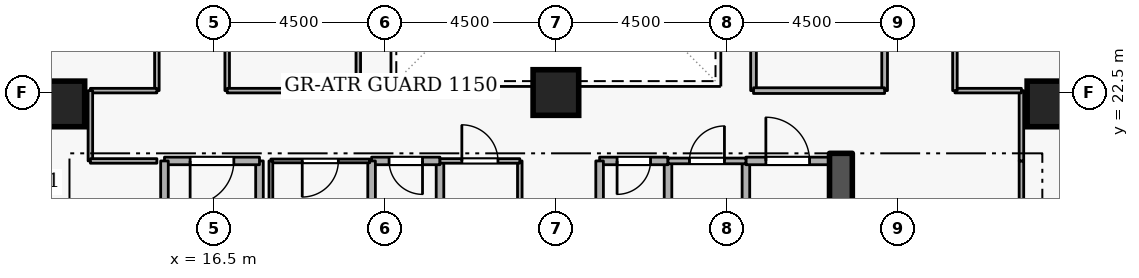
"""IFC4 building model, lengths in metres.
Left out: names, types, materials, properties, quantities, classifications, styles, units other than length and angle.
Written with IfcOpenShell. Run it as: python <this file> out.ifc"""

import sys

from ifc_helpers import new_model, si_unit, direction, frame, frame_2d, origin, origin_2d, place, context, subcontext, project, spatial, rectangle, extrude, element, fill, save


model = new_model("IFC4")
c1 = context("Model", 3, precision=1e-05, world=origin(), true_north=direction((0.0, 1.0)))
c2 = subcontext(c1, "Body", "Model", "MODEL_VIEW")
j1 = project(units=[si_unit("LENGTHUNIT", "METRE"), si_unit("PLANEANGLEUNIT", "RADIAN")], contexts=[c1])
p1 = place(None, origin())
s1 = spatial("IfcSite", under=j1, at=p1, CompositionType="ELEMENT")
p2 = place(p1, origin())
s2 = spatial("IfcBuilding", under=s1, at=p2, CompositionType="ELEMENT")
p3 = place(p2, frame((0.0, 0.0, 116.1)))
s3 = spatial("IfcBuildingStorey", under=s2, at=p3, CompositionType="ELEMENT", Elevation=116.1)
p4 = place(p3, frame((33.0, 15.2, 0.0), z_axis=(0.0, 0.0, 1.0), x_axis=(0.0, 1.0, 0.0)))
e1 = element("IfcWall", 1, at=p4, inside=s3, PredefinedType="SHEAR", context=c2, shape_type="SweptSolid", body=[
    extrude(rectangle(XDim=5.7, YDim=0.6, at=frame_2d((2.85, 0.0))), origin(), (0.0, 0.0, 1.0), 3.6),
])
for number, where, z_axis, x_axis in (
    (2, (12.5, 22.2, 0.0), (0.0, 0.0, 1.0), (1.0, 0.0, 0.0)),
    (3, (38.5, 22.2, 0.0), (0.0, 0.0, 1.0), (1.0, 0.0, 0.0)),
    (4, (25.5, 22.5, 0.0), (0.0, 0.0, 1.0), (1.0, 0.0, 0.0)),
):
    element("IfcColumn", number, at=place(p3, frame(where, z_axis=z_axis, x_axis=x_axis)), inside=s3, PredefinedType="COLUMN", context=c2, shape_type="SweptSolid", body=[
        extrude(rectangle(XDim=1.2, YDim=1.2, at=origin_2d()), origin(), (0.0, 0.0, 1.0), 3.6),
    ])
p5 = place(p3, frame((17.7, 18.4, 0.0), z_axis=(0.0, 0.0, 1.0), x_axis=(0.0, 1.0, 0.0)))
e5 = element("IfcWall", 5, at=p5, inside=s3, PredefinedType="STANDARD", context=c2, shape_type="SweptSolid", body=[
    extrude(rectangle(XDim=2.3, YDim=0.2, at=frame_2d((1.15, 0.0))), origin(), (0.0, 0.0, 1.0), 2.525),
])
p6 = place(p3, frame((17.7, 20.7, 0.0), z_axis=(0.0, 0.0, 1.0), x_axis=(-1.0, 0.0, 0.0)))
e6 = element("IfcWall", 6, at=p6, inside=s3, PredefinedType="STANDARD", context=c2, shape_type="SweptSolid", body=[
    extrude(rectangle(XDim=2.5, YDim=0.2, at=frame_2d((1.25, 0.0))), origin(), (0.0, 0.0, 1.0), 3.32),
])
p7 = place(p6, frame((0.675, 0.0, 0.0)))
e7 = element("IfcOpeningElement", 7, at=p7, cuts=e6, PredefinedType="OPENING", context=c2, shape_type="SweptSolid", body=[
    extrude(rectangle(XDim=1.15, YDim=2.1, at=frame_2d((0.575, 1.05))), frame((0.0, 0.11, 0.0), z_axis=(0.0, -1.0, 0.0), x_axis=(1.0, 0.0, 0.0)), (0.0, 0.0, 1.0), 0.22),
])
p8 = place(p3, frame((15.2, 20.7, 0.0), z_axis=(0.0, 0.0, 1.0), x_axis=(0.0, -1.0, 0.0)))
e8 = element("IfcWall", 8, at=p8, inside=s3, PredefinedType="STANDARD", context=c2, shape_type="SweptSolid", body=[
    extrude(rectangle(XDim=5.7, YDim=0.2, at=frame_2d((2.85, 0.0))), origin(), (0.0, 0.0, 1.0), 3.32),
])
p9 = place(p3, frame((28.45, 18.65, 0.0), z_axis=(0.0, 0.0, 1.0), x_axis=(0.0, 1.0, 0.0)))
e9 = element("IfcWall", 9, at=p9, inside=s3, PredefinedType="STANDARD", context=c2, shape_type="SweptSolid", body=[
    extrude(rectangle(XDim=2.05, YDim=0.2, at=frame_2d((1.025, 0.0))), origin(), (0.0, 0.0, 1.0), 3.32),
])
p10 = place(p3, frame((28.45, 20.7, 0.0), z_axis=(0.0, 0.0, 1.0), x_axis=(-1.0, 0.0, 0.0)))
e10 = element("IfcWall", 10, at=p10, inside=s3, PredefinedType="STANDARD", context=c2, shape_type="SweptSolid", body=[
    extrude(rectangle(XDim=1.8, YDim=0.2, at=frame_2d((0.9, 0.0))), origin(), (0.0, 0.0, 1.0), 3.32),
])
p11 = place(p10, frame((0.46, 0.0, 0.0)))
e11 = element("IfcOpeningElement", 11, at=p11, cuts=e10, PredefinedType="OPENING", context=c2, shape_type="SweptSolid", body=[
    extrude(rectangle(XDim=0.88, YDim=2.04, at=frame_2d((0.44, 1.02))), frame((0.0, 0.11, 0.0), z_axis=(0.0, -1.0, 0.0), x_axis=(1.0, 0.0, 0.0)), (0.0, 0.0, 1.0), 0.22),
])
for number, where, z_axis, x_axis in (
    (12, (26.65, 20.7, 0.0), (0.0, 0.0, 1.0), (0.0, -1.0, 0.0)),
    (13, (22.45, 18.65, 0.0), (0.0, 0.0, 1.0), (0.0, 1.0, 0.0)),
):
    element("IfcWall", number, at=place(p3, frame(where, z_axis=z_axis, x_axis=x_axis)), inside=s3, PredefinedType="STANDARD", context=c2, shape_type="SweptSolid", body=[
        extrude(rectangle(XDim=2.05, YDim=0.2, at=frame_2d((1.025, 0.0))), origin(), (0.0, 0.0, 1.0), 3.32),
    ])
p12 = place(p3, frame((22.45, 20.7, 0.0), z_axis=(0.0, 0.0, 1.0), x_axis=(-1.0, 0.0, 0.0)))
e14 = element("IfcWall", 14, at=p12, inside=s3, PredefinedType="STANDARD", context=c2, shape_type="SweptSolid", body=[
    extrude(rectangle(XDim=1.8, YDim=0.2, at=frame_2d((0.9, 0.0))), origin(), (0.0, 0.0, 1.0), 3.32),
])
p13 = place(p12, frame((0.46, 0.0, 0.0)))
e15 = element("IfcOpeningElement", 15, at=p13, cuts=e14, PredefinedType="OPENING", context=c2, shape_type="SweptSolid", body=[
    extrude(rectangle(XDim=0.88, YDim=2.04, at=frame_2d((0.44, 1.02))), frame((0.0, 0.11, 0.0), z_axis=(0.0, -1.0, 0.0), x_axis=(1.0, 0.0, 0.0)), (0.0, 0.0, 1.0), 0.22),
])
for number, where, z_axis, x_axis in (
    (16, (20.65, 20.7, 0.0), (0.0, 0.0, 1.0), (0.0, -1.0, 0.0)),
    (17, (30.5, 18.65, 0.0), (0.0, 0.0, 1.0), (0.0, 1.0, 0.0)),
):
    element("IfcWall", number, at=place(p3, frame(where, z_axis=z_axis, x_axis=x_axis)), inside=s3, PredefinedType="STANDARD", context=c2, shape_type="SweptSolid", body=[
        extrude(rectangle(XDim=2.05, YDim=0.2, at=frame_2d((1.025, 0.0))), origin(), (0.0, 0.0, 1.0), 3.32),
    ])
p14 = place(p3, frame((30.5, 20.7, 0.0), z_axis=(0.0, 0.0, 1.0), x_axis=(1.0, 0.0, 0.0)))
e18 = element("IfcWall", 18, at=p14, inside=s3, PredefinedType="STANDARD", context=c2, shape_type="SweptSolid", body=[
    extrude(rectangle(XDim=2.2, YDim=0.2, at=frame_2d((1.1, 0.0))), origin(), (0.0, 0.0, 1.0), 3.32),
])
p15 = place(p14, frame((0.525, 0.0, 0.0)))
e19 = element("IfcOpeningElement", 19, at=p15, cuts=e18, PredefinedType="OPENING", context=c2, shape_type="SweptSolid", body=[
    extrude(rectangle(XDim=1.15, YDim=2.1, at=frame_2d((0.575, 1.05))), frame((0.0, 0.11, 0.0), z_axis=(0.0, -1.0, 0.0), x_axis=(1.0, 0.0, 0.0)), (0.0, 0.0, 1.0), 0.22),
])
p16 = place(p3, frame((20.6, 20.7, 0.0), z_axis=(0.0, 0.0, 1.0), x_axis=(-1.0, 0.0, 0.0)))
e20 = element("IfcWall", 20, at=p16, inside=s3, PredefinedType="PARTITIONING", context=c2, shape_type="SweptSolid", body=[
    extrude(rectangle(XDim=2.6, YDim=0.1, at=frame_2d((1.3, 0.0))), origin(), (0.0, 0.0, 1.0), 3.32),
])
p17 = place(p16, frame((0.825, 0.0, 0.0)))
e21 = element("IfcOpeningElement", 21, at=p17, cuts=e20, PredefinedType="OPENING", context=c2, shape_type="SweptSolid", body=[
    extrude(rectangle(XDim=0.95, YDim=2.1, at=frame_2d((0.475, 1.05))), frame((0.0, 0.06, 0.0), z_axis=(0.0, -1.0, 0.0), x_axis=(1.0, 0.0, 0.0)), (0.0, 0.0, 1.0), 0.12),
])
p18 = place(p3, frame((18.0, 20.7, 0.0), z_axis=(0.0, 0.0, 1.0), x_axis=(0.0, -1.0, 0.0)))
e22 = element("IfcWall", 22, at=p18, inside=s3, PredefinedType="PARTITIONING", context=c2, shape_type="SweptSolid", body=[
    extrude(rectangle(XDim=2.05, YDim=0.1, at=frame_2d((1.025, 0.0))), origin(), (0.0, 0.0, 1.0), 2.525),
])
p19 = place(p3, frame((24.55, 20.7, 0.0), z_axis=(0.0, 0.0, 1.0), x_axis=(0.0, -1.0, 0.0)))
e23 = element("IfcWall", 23, at=p19, inside=s3, PredefinedType="PARTITIONING", context=c2, shape_type="SweptSolid", body=[
    extrude(rectangle(XDim=2.05, YDim=0.12, at=frame_2d((1.025, 0.0))), origin(), (0.0, 0.0, 1.0), 3.32),
])
p20 = place(p3, frame((22.45, 20.7, 0.0), z_axis=(0.0, 0.0, 1.0), x_axis=(1.0, 0.0, 0.0)))
e24 = element("IfcWall", 24, at=p20, inside=s3, PredefinedType="PARTITIONING", context=c2, shape_type="SweptSolid", body=[
    extrude(rectangle(XDim=2.1, YDim=0.12, at=frame_2d((1.05, 0.0))), origin(), (0.0, 0.0, 1.0), 3.32),
])
p21 = place(p20, frame((0.575, 0.0, 0.0)))
e25 = element("IfcOpeningElement", 25, at=p21, cuts=e24, PredefinedType="OPENING", context=c2, shape_type="SweptSolid", body=[
    extrude(rectangle(XDim=0.95, YDim=2.1, at=frame_2d((0.475, 1.05))), frame((0.0, 0.07, 0.0), z_axis=(0.0, -1.0, 0.0), x_axis=(1.0, 0.0, 0.0)), (0.0, 0.0, 1.0), 0.14),
])
p22 = place(p3, frame((28.45, 20.7, 0.0), z_axis=(0.0, 0.0, 1.0), x_axis=(1.0, 0.0, 0.0)))
e26 = element("IfcWall", 26, at=p22, inside=s3, PredefinedType="PARTITIONING", context=c2, shape_type="SweptSolid", body=[
    extrude(rectangle(XDim=2.05, YDim=0.15, at=frame_2d((1.025, 0.0))), origin(), (0.0, 0.0, 1.0), 3.32),
])
p23 = place(p22, frame((0.565, 0.0, 0.0)))
e27 = element("IfcOpeningElement", 27, at=p23, cuts=e26, PredefinedType="OPENING", context=c2, shape_type="SweptSolid", body=[
    extrude(rectangle(XDim=0.92, YDim=2.08, at=frame_2d((0.46, 1.04))), frame((0.0, 0.085, 0.0), z_axis=(0.0, -1.0, 0.0), x_axis=(1.0, 0.0, 0.0)), (0.0, 0.0, 1.0), 0.17),
])
p24 = place(p3, frame((15.0, 27.0, 0.0), z_axis=(0.0, 0.0, 1.0), x_axis=(0.0, -1.0, 0.0)))
e28 = element("IfcWall", 28, at=p24, inside=s3, PredefinedType="PARTITIONING", context=c2, shape_type="SweptSolid", body=[
    extrude(rectangle(XDim=4.45, YDim=0.12, at=frame_2d((2.225, 0.0))), origin(), (0.0, 0.0, 1.0), 3.32),
])
p25 = place(p24, frame((1.7, 0.0, 0.0)))
e29 = element("IfcOpeningElement", 29, at=p25, cuts=e28, PredefinedType="OPENING", context=c2, shape_type="SweptSolid", body=[
    extrude(rectangle(XDim=1.05, YDim=2.1, at=frame_2d((0.525, 1.05))), frame((0.0, 0.07, 0.0), z_axis=(0.0, -1.0, 0.0), x_axis=(1.0, 0.0, 0.0)), (0.0, 0.0, 1.0), 0.14),
])
p26 = place(p3, frame((15.0, 22.55, 0.0), z_axis=(0.0, 0.0, 1.0), x_axis=(-1.0, 0.0, 0.0)))
e30 = element("IfcWall", 30, at=p26, inside=s3, PredefinedType="PARTITIONING", context=c2, shape_type="SweptSolid", body=[
    extrude(rectangle(XDim=1.75, YDim=0.12, at=frame_2d((0.875, 0.0))), origin(), (0.0, 0.0, 1.0), 3.32),
])
p27 = place(p3, frame((13.25, 22.55, 0.0), z_axis=(0.0, 0.0, 1.0), x_axis=(0.0, -1.0, 0.0)))
e31 = element("IfcWall", 31, at=p27, inside=s3, PredefinedType="PARTITIONING", context=c2, shape_type="SweptSolid", body=[
    extrude(rectangle(XDim=1.85, YDim=0.12, at=frame_2d((0.925, 0.0))), origin(), (0.0, 0.0, 1.0), 3.32),
])
p28 = place(p3, frame((13.25, 20.7, 0.0), z_axis=(0.0, 0.0, 1.0), x_axis=(1.0, 0.0, 0.0)))
e32 = element("IfcWall", 32, at=p28, inside=s3, PredefinedType="PARTITIONING", context=c2, shape_type="SweptSolid", body=[
    extrude(rectangle(XDim=1.75, YDim=0.12, at=frame_2d((0.875, 0.0))), origin(), (0.0, 0.0, 1.0), 3.32),
])
p29 = place(p3, frame((37.75, 17.55, 0.0), z_axis=(0.0, 0.0, 1.0), x_axis=(0.0, 1.0, 0.0)))
e33 = element("IfcWall", 33, at=p29, inside=s3, PredefinedType="PARTITIONING", context=c2, shape_type="SweptSolid", body=[
    extrude(rectangle(XDim=3.15, YDim=0.12, at=frame_2d((1.575, 0.0))), origin(), (0.0, 0.0, 1.0), 3.32),
])
p30 = place(p3, frame((37.75, 20.7, 0.0), z_axis=(0.0, 0.0, 1.0), x_axis=(0.0, 1.0, 0.0)))
e34 = element("IfcWall", 34, at=p30, inside=s3, PredefinedType="PARTITIONING", context=c2, shape_type="SweptSolid", body=[
    extrude(rectangle(XDim=1.85, YDim=0.12, at=frame_2d((0.925, 0.0))), origin(), (0.0, 0.0, 1.0), 3.32),
])
p31 = place(p3, frame((37.75, 22.55, 0.0), z_axis=(0.0, 0.0, 1.0), x_axis=(-1.0, 0.0, 0.0)))
e35 = element("IfcWall", 35, at=p31, inside=s3, PredefinedType="PARTITIONING", context=c2, shape_type="SweptSolid", body=[
    extrude(rectangle(XDim=1.75, YDim=0.12, at=frame_2d((0.875, 0.0))), origin(), (0.0, 0.0, 1.0), 3.32),
])
p32 = place(p3, frame((36.0, 22.55, 0.0), z_axis=(0.0, 0.0, 1.0), x_axis=(0.0, 1.0, 0.0)))
e36 = element("IfcWall", 36, at=p32, inside=s3, PredefinedType="PARTITIONING", context=c2, shape_type="SweptSolid", body=[
    extrude(rectangle(XDim=4.45, YDim=0.12, at=frame_2d((2.225, 0.0))), origin(), (0.0, 0.0, 1.0), 3.32),
])
p33 = place(p32, frame((1.7, 0.0, 0.0)))
e37 = element("IfcOpeningElement", 37, at=p33, cuts=e36, PredefinedType="OPENING", context=c2, shape_type="SweptSolid", body=[
    extrude(rectangle(XDim=1.05, YDim=2.1, at=frame_2d((0.525, 1.05))), frame((0.0, 0.07, 0.0), z_axis=(0.0, -1.0, 0.0), x_axis=(1.0, 0.0, 0.0)), (0.0, 0.0, 1.0), 0.14),
])
p34 = place(p3, frame((30.7, 22.55, 0.0), z_axis=(0.0, 0.0, 1.0), x_axis=(0.0, 1.0, 0.0)))
e38 = element("IfcWall", 38, at=p34, inside=s3, PredefinedType="PARTITIONING", context=c2, shape_type="SweptSolid", body=[
    extrude(rectangle(XDim=8.9, YDim=0.15, at=frame_2d((4.45, 0.0))), origin(), (0.0, 0.0, 1.0), 3.32),
])
p35 = place(p3, frame((34.15, 31.45, 0.0), z_axis=(0.0, 0.0, 1.0), x_axis=(0.0, -1.0, 0.0)))
e39 = element("IfcWall", 39, at=p35, inside=s3, PredefinedType="PARTITIONING", context=c2, shape_type="SweptSolid", body=[
    extrude(rectangle(XDim=8.9, YDim=0.15, at=frame_2d((4.45, 0.0))), origin(), (0.0, 0.0, 1.0), 3.32),
])
p36 = place(p35, frame((3.8, 0.0, 0.0)))
e40 = element("IfcOpeningElement", 40, at=p36, cuts=e39, PredefinedType="OPENING", context=c2, shape_type="SweptSolid", body=[
    extrude(rectangle(XDim=1.3, YDim=2.12, at=frame_2d((0.65, 1.06))), frame((0.0, 0.085, 0.0), z_axis=(0.0, -1.0, 0.0), x_axis=(1.0, 0.0, 0.0)), (0.0, 0.0, 1.0), 0.17),
])
p37 = place(p3, frame((34.15, 22.55, 0.0), z_axis=(0.0, 0.0, 1.0), x_axis=(-1.0, 0.0, 0.0)))
e41 = element("IfcWall", 41, at=p37, inside=s3, PredefinedType="PARTITIONING", context=c2, shape_type="SweptSolid", body=[
    extrude(rectangle(XDim=3.45, YDim=0.15, at=frame_2d((1.725, 0.0))), origin(), (0.0, 0.0, 1.0), 3.32),
])
p38 = place(p3, frame((16.85, 22.55, 0.0), z_axis=(0.0, 0.0, 1.0), x_axis=(0.0, 1.0, 0.0)))
e42 = element("IfcWall", 42, at=p38, inside=s3, PredefinedType="PARTITIONING", context=c2, shape_type="SweptSolid", body=[
    extrude(rectangle(XDim=8.9, YDim=0.12, at=frame_2d((4.45, 0.0))), origin(), (0.0, 0.0, 1.0), 3.32),
])
p39 = place(p38, frame((2.875, 0.0, 0.0)))
e43 = element("IfcOpeningElement", 43, at=p39, cuts=e42, PredefinedType="OPENING", context=c2, shape_type="SweptSolid", body=[
    extrude(rectangle(XDim=0.95, YDim=2.1, at=frame_2d((0.475, 1.05))), frame((0.0, 0.07, 0.0), z_axis=(0.0, -1.0, 0.0), x_axis=(1.0, 0.0, 0.0)), (0.0, 0.0, 1.0), 0.14),
])
p40 = place(p3, frame((20.3, 31.45, 0.0), z_axis=(0.0, 0.0, 1.0), x_axis=(0.0, -1.0, 0.0)))
e44 = element("IfcWall", 44, at=p40, inside=s3, PredefinedType="PARTITIONING", context=c2, shape_type="SweptSolid", body=[
    extrude(rectangle(XDim=8.9, YDim=0.12, at=frame_2d((4.45, 0.0))), origin(), (0.0, 0.0, 1.0), 3.32),
])
p41 = place(p3, frame((20.3, 22.55, 0.0), z_axis=(0.0, 0.0, 1.0), x_axis=(-1.0, 0.0, 0.0)))
e45 = element("IfcWall", 45, at=p41, inside=s3, PredefinedType="PARTITIONING", context=c2, shape_type="SweptSolid", body=[
    extrude(rectangle(XDim=3.45, YDim=0.12, at=frame_2d((1.725, 0.0))), origin(), (0.0, 0.0, 1.0), 3.32),
])
p42 = place(p7, origin())
e46 = element("IfcDoor", 46, at=p42, inside=s3, OperationType="SINGLE_SWING_RIGHT", PredefinedType="DOOR", context=c2, shape_type="SweptSolid", body=[
    extrude(rectangle(XDim=1.15, YDim=2.1, at=frame_2d((0.575, 1.05))), frame((0.0, 0.025, 0.0), z_axis=(0.0, -1.0, 0.0), x_axis=(1.0, 0.0, 0.0)), (0.0, 0.0, 1.0), 0.05),
])
fill(e7, e46)
p43 = place(p11, origin())
e47 = element("IfcDoor", 47, at=p43, inside=s3, OperationType="SINGLE_SWING_RIGHT", PredefinedType="DOOR", context=c2, shape_type="SweptSolid", body=[
    extrude(rectangle(XDim=0.88, YDim=2.04, at=frame_2d((0.44, 1.02))), frame((0.0, 0.025, 0.0), z_axis=(0.0, -1.0, 0.0), x_axis=(1.0, 0.0, 0.0)), (0.0, 0.0, 1.0), 0.05),
])
fill(e11, e47)
p44 = place(p13, origin())
e48 = element("IfcDoor", 48, at=p44, inside=s3, OperationType="SINGLE_SWING_LEFT", PredefinedType="DOOR", context=c2, shape_type="SweptSolid", body=[
    extrude(rectangle(XDim=0.88, YDim=2.04, at=frame_2d((0.44, 1.02))), frame((0.0, 0.025, 0.0), z_axis=(0.0, -1.0, 0.0), x_axis=(1.0, 0.0, 0.0)), (0.0, 0.0, 1.0), 0.05),
])
fill(e15, e48)
p45 = place(p17, origin())
e49 = element("IfcDoor", 49, at=p45, inside=s3, OperationType="SINGLE_SWING_RIGHT", PredefinedType="DOOR", context=c2, shape_type="SweptSolid", body=[
    extrude(rectangle(XDim=0.95, YDim=2.1, at=frame_2d((0.475, 1.05))), frame((0.0, 0.025, 0.0), z_axis=(0.0, -1.0, 0.0), x_axis=(1.0, 0.0, 0.0)), (0.0, 0.0, 1.0), 0.05),
])
fill(e21, e49)
p46 = place(p21, origin())
e50 = element("IfcDoor", 50, at=p46, inside=s3, OperationType="SINGLE_SWING_LEFT", PredefinedType="DOOR", context=c2, shape_type="SweptSolid", body=[
    extrude(rectangle(XDim=0.95, YDim=2.1, at=frame_2d((0.475, 1.05))), frame((0.0, 0.025, 0.0), z_axis=(0.0, -1.0, 0.0), x_axis=(1.0, 0.0, 0.0)), (0.0, 0.0, 1.0), 0.05),
])
fill(e25, e50)
p47 = place(p23, origin())
e51 = element("IfcDoor", 51, at=p47, inside=s3, OperationType="SINGLE_SWING_RIGHT", PredefinedType="DOOR", context=c2, shape_type="SweptSolid", body=[
    extrude(rectangle(XDim=0.92, YDim=2.08, at=frame_2d((0.46, 1.04))), frame((0.0, 0.025, 0.0), z_axis=(0.0, -1.0, 0.0), x_axis=(1.0, 0.0, 0.0)), (0.0, 0.0, 1.0), 0.05),
])
fill(e27, e51)
p48 = place(p15, origin())
e52 = element("IfcDoor", 52, at=p48, inside=s3, OperationType="SINGLE_SWING_LEFT", PredefinedType="DOOR", context=c2, shape_type="SweptSolid", body=[
    extrude(rectangle(XDim=1.15, YDim=2.1, at=frame_2d((0.575, 1.05))), frame((0.0, 0.025, 0.0), z_axis=(0.0, -1.0, 0.0), x_axis=(1.0, 0.0, 0.0)), (0.0, 0.0, 1.0), 0.05),
])
fill(e19, e52)
save(model, sys.argv[1])
